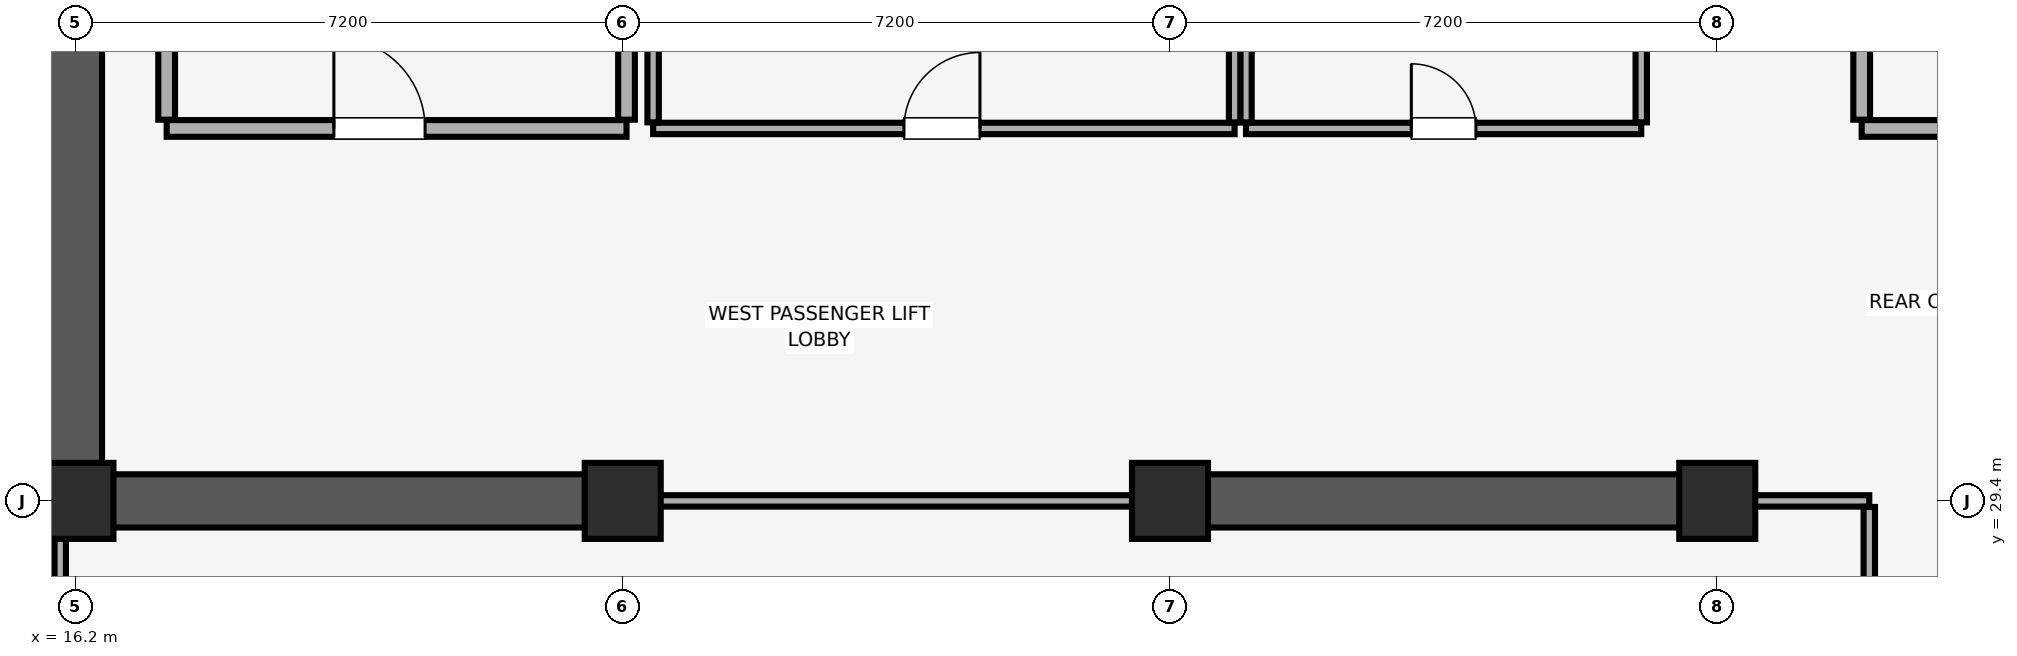
"""IFC4 building model, lengths in metres.
Left out: names, types, materials, properties, quantities, classifications, styles, units other than length and angle.
Written with IfcOpenShell. Run it as: python <this file> out.ifc"""

import sys

from ifc_helpers import new_model, si_unit, direction, frame, frame_2d, origin, origin_2d, place, context, subcontext, project, spatial, rectangle, extrude, element, fill, save


model = new_model("IFC4")
c1 = context("Model", 3, precision=1e-05, world=origin(), true_north=direction((0.0, 1.0)))
c2 = subcontext(c1, "Body", "Model", "MODEL_VIEW")
j1 = project(units=[si_unit("LENGTHUNIT", "METRE"), si_unit("PLANEANGLEUNIT", "RADIAN")], contexts=[c1])
p1 = place(None, origin())
s1 = spatial("IfcSite", under=j1, at=p1, CompositionType="ELEMENT")
p2 = place(p1, origin())
s2 = spatial("IfcBuilding", under=s1, at=p2, CompositionType="ELEMENT")
p3 = place(p2, frame((0.0, 0.0, 300.2)))
s3 = spatial("IfcBuildingStorey", under=s2, at=p3, CompositionType="ELEMENT", Elevation=300.2)
for number, where, z_axis, x_axis in (
    (1, (16.2, 29.4, 0.0), (0.0, 0.0, 1.0), (1.0, 0.0, 0.0)),
    (2, (23.4, 29.4, 0.0), (0.0, 0.0, 1.0), (1.0, 0.0, 0.0)),
    (3, (30.6, 29.4, 0.0), (0.0, 0.0, 1.0), (1.0, 0.0, 0.0)),
    (4, (37.8, 29.4, 0.0), (0.0, 0.0, 1.0), (1.0, 0.0, 0.0)),
):
    element("IfcColumn", number, at=place(p3, frame(where, z_axis=z_axis, x_axis=x_axis)), inside=s3, PredefinedType="COLUMN", context=c2, shape_type="SweptSolid", body=[
        extrude(rectangle(XDim=1.0, YDim=1.0, at=origin_2d()), origin(), (0.0, 0.0, 1.0), 5.12),
    ])
p4 = place(p3, frame((16.2, 29.4, 0.0), z_axis=(0.0, 0.0, 1.0), x_axis=(0.0, 1.0, 0.0)))
e5 = element("IfcWall", 5, at=p4, inside=s3, PredefinedType="SHEAR", context=c2, shape_type="SweptSolid", body=[
    extrude(rectangle(XDim=19.2, YDim=0.7, at=frame_2d((9.6, 0.0))), origin(), (0.0, 0.0, 1.0), 5.12),
])
p5 = place(p3, frame((16.555, 29.4, 0.0), z_axis=(0.0, 0.0, 1.0), x_axis=(1.0, 0.0, 0.0)))
e6 = element("IfcWall", 6, at=p5, inside=s3, PredefinedType="SHEAR", context=c2, shape_type="SweptSolid", body=[
    extrude(rectangle(XDim=7.045, YDim=0.7, at=frame_2d((3.522, 0.0))), origin(), (0.0, 0.0, 1.0), 5.12),
])
p6 = place(p3, frame((30.4, 29.4, 0.0), z_axis=(0.0, 0.0, 1.0), x_axis=(1.0, 0.0, 0.0)))
e7 = element("IfcWall", 7, at=p6, inside=s3, PredefinedType="SHEAR", context=c2, shape_type="SweptSolid", body=[
    extrude(rectangle(XDim=7.6, YDim=0.7, at=frame_2d((3.8, 0.0))), origin(), (0.0, 0.0, 1.0), 5.12),
])
p7 = place(p3, frame((17.4, 34.3, 0.0), z_axis=(0.0, 0.0, 1.0), x_axis=(1.0, 0.0, 0.0)))
e8 = element("IfcWall", 8, at=p7, inside=s3, PredefinedType="PARTITIONING", context=c2, shape_type="SweptSolid", body=[
    extrude(rectangle(XDim=6.05, YDim=0.22, at=frame_2d((3.025, 0.0))), origin(), (0.0, 0.0, 1.0), 5.12),
])
p8 = place(p7, frame((2.2, 0.0, 0.0)))
e9 = element("IfcOpeningElement", 9, at=p8, cuts=e8, PredefinedType="OPENING", context=c2, shape_type="SweptSolid", body=[
    extrude(rectangle(XDim=1.2, YDim=2.15, at=frame_2d((0.6, 1.075))), frame((0.0, 0.12, 0.0), z_axis=(0.0, -1.0, 0.0), x_axis=(1.0, 0.0, 0.0)), (0.0, 0.0, 1.0), 0.24),
])
p9 = place(p3, frame((17.4, 34.415, 0.0), z_axis=(0.0, 0.0, 1.0), x_axis=(0.0, 1.0, 0.0)))
e10 = element("IfcWall", 10, at=p9, inside=s3, PredefinedType="PARTITIONING", context=c2, shape_type="SweptSolid", body=[
    extrude(rectangle(XDim=5.43, YDim=0.22, at=frame_2d((2.715, 0.0))), origin(), (0.0, 0.0, 1.0), 5.12),
])
p10 = place(p3, frame((23.45, 34.415, 0.0), z_axis=(0.0, 0.0, 1.0), x_axis=(0.0, 1.0, 0.0)))
e11 = element("IfcWall", 11, at=p10, inside=s3, PredefinedType="PARTITIONING", context=c2, shape_type="SweptSolid", body=[
    extrude(rectangle(XDim=5.64, YDim=0.22, at=frame_2d((2.82, 0.0))), origin(), (0.0, 0.0, 1.0), 5.12),
])
p11 = place(p3, frame((39.7, 34.3, 0.0), z_axis=(0.0, 0.0, 1.0), x_axis=(1.0, 0.0, 0.0)))
e12 = element("IfcWall", 12, at=p11, inside=s3, PredefinedType="PARTITIONING", context=c2, shape_type="SweptSolid", body=[
    extrude(rectangle(XDim=4.6, YDim=0.22, at=frame_2d((2.3, 0.0))), origin(), (0.0, 0.0, 1.0), 5.12),
])
p12 = place(p11, frame((1.7, 0.0, 0.0)))
e13 = element("IfcOpeningElement", 13, at=p12, cuts=e12, PredefinedType="OPENING", context=c2, shape_type="SweptSolid", body=[
    extrude(rectangle(XDim=1.2, YDim=2.15, at=frame_2d((0.6, 1.075))), frame((0.0, 0.12, 0.0), z_axis=(0.0, -1.0, 0.0), x_axis=(1.0, 0.0, 0.0)), (0.0, 0.0, 1.0), 0.24),
])
p13 = place(p3, frame((39.7, 34.415, 0.0), z_axis=(0.0, 0.0, 1.0), x_axis=(0.0, 1.0, 0.0)))
e14 = element("IfcWall", 14, at=p13, inside=s3, PredefinedType="PARTITIONING", context=c2, shape_type="SweptSolid", body=[
    extrude(rectangle(XDim=5.785, YDim=0.22, at=frame_2d((2.893, 0.0))), origin(), (0.0, 0.0, 1.0), 5.12),
])
p14 = place(p3, frame((31.6, 34.3, 0.0), z_axis=(0.0, 0.0, 1.0), x_axis=(1.0, 0.0, 0.0)))
e15 = element("IfcWall", 15, at=p14, inside=s3, PredefinedType="PARTITIONING", context=c2, shape_type="SweptSolid", body=[
    extrude(rectangle(XDim=5.2, YDim=0.15, at=frame_2d((2.6, 0.0))), origin(), (0.0, 0.0, 1.0), 5.12),
])
p15 = place(p14, frame((2.175, 0.0, 0.0)))
e16 = element("IfcOpeningElement", 16, at=p15, cuts=e15, PredefinedType="OPENING", context=c2, shape_type="SweptSolid", body=[
    extrude(rectangle(XDim=0.85, YDim=2.1, at=frame_2d((0.425, 1.05))), frame((0.0, 0.085, 0.0), z_axis=(0.0, -1.0, 0.0), x_axis=(1.0, 0.0, 0.0)), (0.0, 0.0, 1.0), 0.17),
])
for number, where, z_axis, x_axis in (
    (17, (31.6, 34.38, 0.0), (0.0, 0.0, 1.0), (0.0, 1.0, 0.0)),
    (18, (36.8, 34.38, 0.0), (0.0, 0.0, 1.0), (0.0, 1.0, 0.0)),
):
    element("IfcWall", number, at=place(p3, frame(where, z_axis=z_axis, x_axis=x_axis)), inside=s3, PredefinedType="PARTITIONING", context=c2, shape_type="SweptSolid", body=[
        extrude(rectangle(XDim=4.94, YDim=0.15, at=frame_2d((2.47, 0.0))), origin(), (0.0, 0.0, 1.0), 5.12),
    ])
p16 = place(p3, frame((23.8, 34.3, 0.0), z_axis=(0.0, 0.0, 1.0), x_axis=(1.0, 0.0, 0.0)))
e19 = element("IfcWall", 19, at=p16, inside=s3, PredefinedType="PARTITIONING", context=c2, shape_type="SweptSolid", body=[
    extrude(rectangle(XDim=7.65, YDim=0.15, at=frame_2d((3.825, 0.0))), origin(), (0.0, 0.0, 1.0), 5.12),
])
p17 = place(p16, frame((3.3, 0.0, 0.0)))
e20 = element("IfcOpeningElement", 20, at=p17, cuts=e19, PredefinedType="OPENING", context=c2, shape_type="SweptSolid", body=[
    extrude(rectangle(XDim=1.0, YDim=2.15, at=frame_2d((0.5, 1.075))), frame((0.0, 0.085, 0.0), z_axis=(0.0, -1.0, 0.0), x_axis=(1.0, 0.0, 0.0)), (0.0, 0.0, 1.0), 0.17),
])
for number, where, z_axis, x_axis in (
    (21, (23.8, 34.38, 0.0), (0.0, 0.0, 1.0), (0.0, 1.0, 0.0)),
    (22, (31.45, 34.38, 0.0), (0.0, 0.0, 1.0), (0.0, 1.0, 0.0)),
):
    element("IfcWall", number, at=place(p3, frame(where, z_axis=z_axis, x_axis=x_axis)), inside=s3, PredefinedType="PARTITIONING", context=c2, shape_type="SweptSolid", body=[
        extrude(rectangle(XDim=4.94, YDim=0.15, at=frame_2d((2.47, 0.0))), origin(), (0.0, 0.0, 1.0), 5.12),
    ])
p18 = place(p3, frame((23.61, 29.4, 0.0), z_axis=(0.0, 0.0, 1.0), x_axis=(1.0, 0.0, 0.0)))
e23 = element("IfcWall", 23, at=p18, inside=s3, PredefinedType="PARTITIONING", context=c2, shape_type="SweptSolid", body=[
    extrude(rectangle(XDim=6.78, YDim=0.15, at=frame_2d((3.39, 0.0))), origin(), (0.0, 0.0, 1.0), 4.02),
])
p19 = place(p3, frame((38.01, 29.4, 0.0), z_axis=(0.0, 0.0, 1.0), x_axis=(1.0, 0.0, 0.0)))
e24 = element("IfcWall", 24, at=p19, inside=s3, PredefinedType="PARTITIONING", context=c2, shape_type="SweptSolid", body=[
    extrude(rectangle(XDim=1.79, YDim=0.15, at=frame_2d((0.895, 0.0))), origin(), (0.0, 0.0, 1.0), 4.02),
])
p20 = place(p3, frame((16.0, 23.48, 0.0), z_axis=(0.0, 0.0, 1.0), x_axis=(0.0, 1.0, 0.0)))
e25 = element("IfcWall", 25, at=p20, inside=s3, PredefinedType="PARTITIONING", context=c2, shape_type="SweptSolid", body=[
    extrude(rectangle(XDim=5.91, YDim=0.15, at=frame_2d((2.955, 0.0))), origin(), (0.0, 0.0, 1.0), 4.76),
])
p21 = place(p3, frame((39.8, 23.48, 0.0), z_axis=(0.0, 0.0, 1.0), x_axis=(0.0, 1.0, 0.0)))
e26 = element("IfcWall", 26, at=p21, inside=s3, PredefinedType="PARTITIONING", context=c2, shape_type="SweptSolid", body=[
    extrude(rectangle(XDim=5.84, YDim=0.15, at=frame_2d((2.92, 0.0))), origin(), (0.0, 0.0, 1.0), 5.12),
])
p22 = place(p8, origin())
e27 = element("IfcDoor", 27, at=p22, inside=s3, OperationType="SINGLE_SWING_LEFT", PredefinedType="DOOR", context=c2, shape_type="SweptSolid", body=[
    extrude(rectangle(XDim=1.2, YDim=2.15, at=frame_2d((0.6, 1.075))), frame((0.0, 0.025, 0.0), z_axis=(0.0, -1.0, 0.0), x_axis=(1.0, 0.0, 0.0)), (0.0, 0.0, 1.0), 0.05),
])
fill(e9, e27)
p23 = place(p15, origin())
e28 = element("IfcDoor", 28, at=p23, inside=s3, OperationType="SINGLE_SWING_LEFT", PredefinedType="DOOR", context=c2, shape_type="SweptSolid", body=[
    extrude(rectangle(XDim=0.85, YDim=2.1, at=frame_2d((0.425, 1.05))), frame((0.0, 0.025, 0.0), z_axis=(0.0, -1.0, 0.0), x_axis=(1.0, 0.0, 0.0)), (0.0, 0.0, 1.0), 0.05),
])
fill(e16, e28)
p24 = place(p17, origin())
e29 = element("IfcDoor", 29, at=p24, inside=s3, OperationType="SINGLE_SWING_RIGHT", PredefinedType="DOOR", context=c2, shape_type="SweptSolid", body=[
    extrude(rectangle(XDim=1.0, YDim=2.15, at=frame_2d((0.5, 1.075))), frame((0.0, 0.025, 0.0), z_axis=(0.0, -1.0, 0.0), x_axis=(1.0, 0.0, 0.0)), (0.0, 0.0, 1.0), 0.05),
])
fill(e20, e29)
save(model, sys.argv[1])
